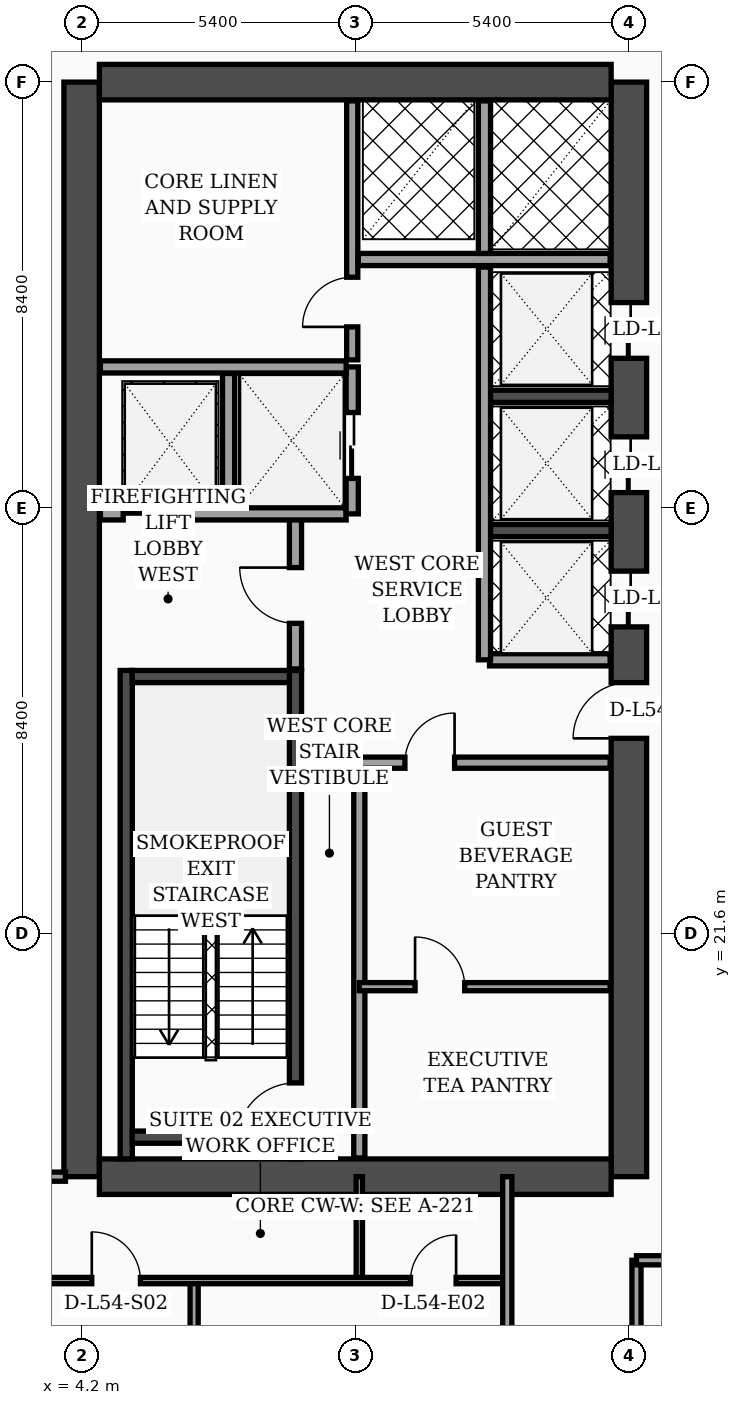
"""IFC4 building model, lengths in metres.
Left out: names, types, materials, properties, quantities, classifications, styles, units other than length and angle.
Written with IfcOpenShell. Run it as: python <this file> out.ifc"""

import sys

from ifc_helpers import new_model, si_unit, direction, frame, frame_2d, origin, place, context, subcontext, project, spatial, rectangle, extrude, element, fill, save


model = new_model("IFC4")
c1 = context("Model", 3, precision=1e-05, world=origin(), true_north=direction((0.0, 1.0)))
c2 = subcontext(c1, "Body", "Model", "MODEL_VIEW")
j1 = project(units=[si_unit("LENGTHUNIT", "METRE"), si_unit("PLANEANGLEUNIT", "RADIAN")], contexts=[c1])
p1 = place(None, origin())
s1 = spatial("IfcSite", under=j1, at=p1, CompositionType="ELEMENT")
p2 = place(p1, origin())
s2 = spatial("IfcBuilding", under=s1, at=p2, CompositionType="ELEMENT")
p3 = place(p2, frame((0.0, 0.0, 219.3)))
s3 = spatial("IfcBuildingStorey", under=s2, at=p3, CompositionType="ELEMENT", Elevation=219.3)
p4 = place(p3, frame((4.2, 16.8, 0.0), z_axis=(0.0, 0.0, 1.0), x_axis=(0.0, 1.0, 0.0)))
e1 = element("IfcWall", 1, at=p4, inside=s3, PredefinedType="SHEAR", context=c2, shape_type="SweptSolid", body=[
    extrude(rectangle(XDim=21.6, YDim=0.7, at=frame_2d((10.8, 0.0))), origin(), (0.0, 0.0, 1.0), 3.56),
])
p5 = place(p3, frame((15.0, 16.8, 0.0), z_axis=(0.0, 0.0, 1.0), x_axis=(0.0, 1.0, 0.0)))
e2 = element("IfcWall", 2, at=p5, inside=s3, PredefinedType="SHEAR", context=c2, shape_type="SweptSolid", body=[
    extrude(rectangle(XDim=21.6, YDim=0.7, at=frame_2d((10.8, 0.0))), origin(), (0.0, 0.0, 1.0), 3.56),
])
p6 = place(p5, frame((8.65, 0.0, 0.0)))
e3 = element("IfcOpeningElement", 3, at=p6, cuts=e2, PredefinedType="OPENING", context=c2, shape_type="SweptSolid", body=[
    extrude(rectangle(XDim=1.1, YDim=2.2, at=frame_2d((0.55, 1.1))), frame((0.0, 0.36, 0.0), z_axis=(0.0, -1.0, 0.0), x_axis=(1.0, 0.0, 0.0)), (0.0, 0.0, 1.0), 0.72),
])
p7 = place(p5, frame((10.85, 0.0, 0.0)))
e4 = element("IfcOpeningElement", 4, at=p7, cuts=e2, PredefinedType="OPENING", context=c2, shape_type="SweptSolid", body=[
    extrude(rectangle(XDim=1.1, YDim=2.2, at=frame_2d((0.55, 1.1))), frame((0.0, 0.36, 0.0), z_axis=(0.0, -1.0, 0.0), x_axis=(1.0, 0.0, 0.0)), (0.0, 0.0, 1.0), 0.72),
])
p8 = place(p5, frame((13.5, 0.0, 0.0)))
e5 = element("IfcOpeningElement", 5, at=p8, cuts=e2, PredefinedType="OPENING", context=c2, shape_type="SweptSolid", body=[
    extrude(rectangle(XDim=1.1, YDim=2.2, at=frame_2d((0.55, 1.1))), frame((0.0, 0.36, 0.0), z_axis=(0.0, -1.0, 0.0), x_axis=(1.0, 0.0, 0.0)), (0.0, 0.0, 1.0), 0.72),
])
p9 = place(p5, frame((16.15, 0.0, 0.0)))
e6 = element("IfcOpeningElement", 6, at=p9, cuts=e2, PredefinedType="OPENING", context=c2, shape_type="SweptSolid", body=[
    extrude(rectangle(XDim=1.1, YDim=2.2, at=frame_2d((0.55, 1.1))), frame((0.0, 0.36, 0.0), z_axis=(0.0, -1.0, 0.0), x_axis=(1.0, 0.0, 0.0)), (0.0, 0.0, 1.0), 0.72),
])
for number, where, z_axis, x_axis in (
    (7, (4.55, 38.4, 0.0), (0.0, 0.0, 1.0), (1.0, 0.0, 0.0)),
    (8, (4.55, 16.8, 0.0), (0.0, 0.0, 1.0), (1.0, 0.0, 0.0)),
):
    element("IfcWall", number, at=place(p3, frame(where, z_axis=z_axis, x_axis=x_axis)), inside=s3, PredefinedType="SHEAR", context=c2, shape_type="SweptSolid", body=[
        extrude(rectangle(XDim=10.1, YDim=0.7, at=frame_2d((5.05, 0.0))), origin(), (0.0, 0.0, 1.0), 3.56),
    ])
p10 = place(p3, frame((5.08, 17.15, 0.0), z_axis=(0.0, 0.0, 1.0), x_axis=(0.0, 1.0, 0.0)))
e9 = element("IfcWall", 9, at=p10, inside=s3, PredefinedType="SOLIDWALL", context=c2, shape_type="SweptSolid", body=[
    extrude(rectangle(XDim=9.64, YDim=0.24, at=frame_2d((4.82, 0.0))), origin(), (0.0, 0.0, 1.0), 3.56),
])
p11 = place(p3, frame((8.42, 17.15, 0.0), z_axis=(0.0, 0.0, 1.0), x_axis=(0.0, 1.0, 0.0)))
e10 = element("IfcWall", 10, at=p11, inside=s3, PredefinedType="SOLIDWALL", context=c2, shape_type="SweptSolid", body=[
    extrude(rectangle(XDim=9.64, YDim=0.24, at=frame_2d((4.82, 0.0))), origin(), (0.0, 0.0, 1.0), 3.56),
])
p12 = place(p11, frame((0.35, 0.0, 0.0)))
e11 = element("IfcOpeningElement", 11, at=p12, cuts=e10, PredefinedType="OPENING", context=c2, shape_type="SweptSolid", body=[
    extrude(rectangle(XDim=1.15, YDim=2.2, at=frame_2d((0.575, 1.1))), frame((0.0, 0.13, 0.0), z_axis=(0.0, -1.0, 0.0), x_axis=(1.0, 0.0, 0.0)), (0.0, 0.0, 1.0), 0.26),
])
for number, where, z_axis, x_axis in (
    (12, (5.2, 17.58, 0.0), (0.0, 0.0, 1.0), (1.0, 0.0, 0.0)),
    (13, (5.2, 26.67, 0.0), (0.0, 0.0, 1.0), (1.0, 0.0, 0.0)),
):
    element("IfcWall", number, at=place(p3, frame(where, z_axis=z_axis, x_axis=x_axis)), inside=s3, PredefinedType="SOLIDWALL", context=c2, shape_type="SweptSolid", body=[
        extrude(rectangle(XDim=3.1, YDim=0.24, at=frame_2d((1.55, 0.0))), origin(), (0.0, 0.0, 1.0), 3.56),
    ])
for number, where, z_axis, x_axis in (
    (14, (12.18, 29.55, 0.0), (0.0, 0.0, 1.0), (1.0, 0.0, 0.0)),
    (15, (12.18, 32.2, 0.0), (0.0, 0.0, 1.0), (1.0, 0.0, 0.0)),
):
    element("IfcWall", number, at=place(p3, frame(where, z_axis=z_axis, x_axis=x_axis)), inside=s3, PredefinedType="SOLIDWALL", context=c2, shape_type="SweptSolid", body=[
        extrude(rectangle(XDim=2.47, YDim=0.24, at=frame_2d((1.235, 0.0))), origin(), (0.0, 0.0, 1.0), 3.56),
    ])
p13 = place(p3, frame((8.42, 26.82, 0.0), z_axis=(0.0, 0.0, 1.0), x_axis=(0.0, 1.0, 0.0)))
e16 = element("IfcWall", 16, at=p13, inside=s3, PredefinedType="SOLIDWALL", context=c2, shape_type="SweptSolid", body=[
    extrude(rectangle(XDim=3.0, YDim=0.24, at=frame_2d((1.5, 0.0))), origin(), (0.0, 0.0, 1.0), 3.56),
])
p14 = place(p13, frame((0.9, 0.0, 0.0)))
e17 = element("IfcOpeningElement", 17, at=p14, cuts=e16, PredefinedType="OPENING", context=c2, shape_type="SweptSolid", body=[
    extrude(rectangle(XDim=1.1, YDim=2.2, at=frame_2d((0.55, 1.1))), frame((0.0, 0.13, 0.0), z_axis=(0.0, -1.0, 0.0), x_axis=(1.0, 0.0, 0.0)), (0.0, 0.0, 1.0), 0.26),
])
p15 = place(p3, frame((4.57, 29.88, 0.0), z_axis=(0.0, 0.0, 1.0), x_axis=(1.0, 0.0, 0.0)))
e18 = element("IfcWall", 18, at=p15, inside=s3, PredefinedType="SOLIDWALL", context=c2, shape_type="SweptSolid", body=[
    extrude(rectangle(XDim=4.85, YDim=0.24, at=frame_2d((2.425, 0.0))), origin(), (0.0, 0.0, 1.0), 3.56),
])
p16 = place(p15, frame((0.45, 0.0, 0.0)))
e19 = element("IfcOpeningElement", 19, at=p16, cuts=e18, PredefinedType="OPENING", context=c2, shape_type="SweptSolid", body=[
    extrude(rectangle(XDim=1.3, YDim=2.35, at=frame_2d((0.65, 1.175))), frame((0.0, 0.13, 0.0), z_axis=(0.0, -1.0, 0.0), x_axis=(1.0, 0.0, 0.0)), (0.0, 0.0, 1.0), 0.26),
])
p17 = place(p3, frame((7.1, 30.02, 0.0), z_axis=(0.0, 0.0, 1.0), x_axis=(0.0, 1.0, 0.0)))
e20 = element("IfcWall", 20, at=p17, inside=s3, PredefinedType="SOLIDWALL", context=c2, shape_type="SweptSolid", body=[
    extrude(rectangle(XDim=2.63, YDim=0.24, at=frame_2d((1.315, 0.0))), origin(), (0.0, 0.0, 1.0), 3.56),
])
p18 = place(p3, frame((9.54, 29.88, 0.0), z_axis=(0.0, 0.0, 1.0), x_axis=(0.0, 1.0, 0.0)))
e21 = element("IfcWall", 21, at=p18, inside=s3, PredefinedType="SOLIDWALL", context=c2, shape_type="SweptSolid", body=[
    extrude(rectangle(XDim=2.9, YDim=0.24, at=frame_2d((1.45, 0.0))), origin(), (0.0, 0.0, 1.0), 3.56),
])
p19 = place(p18, frame((0.7, 0.0, 0.0)))
e22 = element("IfcOpeningElement", 22, at=p19, cuts=e21, PredefinedType="OPENING", context=c2, shape_type="SweptSolid", body=[
    extrude(rectangle(XDim=1.3, YDim=2.35, at=frame_2d((0.65, 1.175))), frame((0.0, 0.13, 0.0), z_axis=(0.0, -1.0, 0.0), x_axis=(1.0, 0.0, 0.0)), (0.0, 0.0, 1.0), 0.26),
])
p20 = place(p3, frame((4.57, 32.78, 0.0), z_axis=(0.0, 0.0, 1.0), x_axis=(1.0, 0.0, 0.0)))
e23 = element("IfcWall", 23, at=p20, inside=s3, PredefinedType="SOLIDWALL", context=c2, shape_type="SweptSolid", body=[
    extrude(rectangle(XDim=4.85, YDim=0.24, at=frame_2d((2.425, 0.0))), origin(), (0.0, 0.0, 1.0), 3.19),
])
p21 = place(p3, frame((9.68, 17.17, 0.0), z_axis=(0.0, 0.0, 1.0), x_axis=(0.0, 1.0, 0.0)))
e24 = element("IfcWall", 24, at=p21, inside=s3, PredefinedType="SOLIDWALL", context=c2, shape_type="SweptSolid", body=[
    extrude(rectangle(XDim=7.83, YDim=0.22, at=frame_2d((3.915, 0.0))), origin(), (0.0, 0.0, 1.0), 3.56),
])
p22 = place(p3, frame((9.54, 32.92, 0.0), z_axis=(0.0, 0.0, 1.0), x_axis=(0.0, 1.0, 0.0)))
e25 = element("IfcWall", 25, at=p22, inside=s3, PredefinedType="SOLIDWALL", context=c2, shape_type="SweptSolid", body=[
    extrude(rectangle(XDim=5.11, YDim=0.22, at=frame_2d((2.555, 0.0))), origin(), (0.0, 0.0, 1.0), 3.56),
])
p23 = place(p22, frame((0.65, 0.0, 0.0)))
e26 = element("IfcOpeningElement", 26, at=p23, cuts=e25, PredefinedType="OPENING", context=c2, shape_type="SweptSolid", body=[
    extrude(rectangle(XDim=0.98, YDim=2.15, at=frame_2d((0.49, 1.075))), frame((0.0, 0.12, 0.0), z_axis=(0.0, -1.0, 0.0), x_axis=(1.0, 0.0, 0.0)), (0.0, 0.0, 1.0), 0.24),
])
p24 = place(p3, frame((9.68, 20.55, 0.0), z_axis=(0.0, 0.0, 1.0), x_axis=(1.0, 0.0, 0.0)))
e27 = element("IfcWall", 27, at=p24, inside=s3, PredefinedType="PARTITIONING", context=c2, shape_type="SweptSolid", body=[
    extrude(rectangle(XDim=4.95, YDim=0.16, at=frame_2d((2.475, 0.0))), origin(), (0.0, 0.0, 1.0), 3.56),
])
p25 = place(p24, frame((1.1, 0.0, 0.0)))
e28 = element("IfcOpeningElement", 28, at=p25, cuts=e27, PredefinedType="OPENING", context=c2, shape_type="SweptSolid", body=[
    extrude(rectangle(XDim=0.98, YDim=2.15, at=frame_2d((0.49, 1.075))), frame((0.0, 0.09, 0.0), z_axis=(0.0, -1.0, 0.0), x_axis=(1.0, 0.0, 0.0)), (0.0, 0.0, 1.0), 0.18),
])
p26 = place(p3, frame((9.68, 24.97, 0.0), z_axis=(0.0, 0.0, 1.0), x_axis=(1.0, 0.0, 0.0)))
e29 = element("IfcWall", 29, at=p26, inside=s3, PredefinedType="SOLIDWALL", context=c2, shape_type="SweptSolid", body=[
    extrude(rectangle(XDim=4.95, YDim=0.22, at=frame_2d((2.475, 0.0))), origin(), (0.0, 0.0, 1.0), 2.94),
])
p27 = place(p26, frame((0.9, 0.0, 0.0)))
e30 = element("IfcOpeningElement", 30, at=p27, cuts=e29, PredefinedType="OPENING", context=c2, shape_type="SweptSolid", body=[
    extrude(rectangle(XDim=0.98, YDim=2.15, at=frame_2d((0.49, 1.075))), frame((0.0, 0.12, 0.0), z_axis=(0.0, -1.0, 0.0), x_axis=(1.0, 0.0, 0.0)), (0.0, 0.0, 1.0), 0.24),
])
p28 = place(p3, frame((12.25, 27.0, 0.0), z_axis=(0.0, 0.0, 1.0), x_axis=(1.0, 0.0, 0.0)))
e31 = element("IfcWall", 31, at=p28, inside=s3, PredefinedType="SOLIDWALL", context=c2, shape_type="SweptSolid", body=[
    extrude(rectangle(XDim=2.38, YDim=0.24, at=frame_2d((1.19, 0.0))), origin(), (0.0, 0.0, 1.0), 3.56),
])
p29 = place(p3, frame((12.15, 27.0, 0.0), z_axis=(0.0, 0.0, 1.0), x_axis=(0.0, 1.0, 0.0)))
e32 = element("IfcWall", 32, at=p29, inside=s3, PredefinedType="SOLIDWALL", context=c2, shape_type="SweptSolid", body=[
    extrude(rectangle(XDim=7.75, YDim=0.24, at=frame_2d((3.875, 0.0))), origin(), (0.0, 0.0, 1.0), 3.56),
])
p30 = place(p3, frame((9.66, 34.9, 0.0), z_axis=(0.0, 0.0, 1.0), x_axis=(1.0, 0.0, 0.0)))
e33 = element("IfcWall", 33, at=p30, inside=s3, PredefinedType="SOLIDWALL", context=c2, shape_type="SweptSolid", body=[
    extrude(rectangle(XDim=4.97, YDim=0.24, at=frame_2d((2.485, 0.0))), origin(), (0.0, 0.0, 1.0), 3.56),
])
p31 = place(p3, frame((12.15, 35.02, 0.0), z_axis=(0.0, 0.0, 1.0), x_axis=(0.0, 1.0, 0.0)))
e34 = element("IfcWall", 34, at=p31, inside=s3, PredefinedType="SOLIDWALL", context=c2, shape_type="SweptSolid", body=[
    extrude(rectangle(XDim=3.01, YDim=0.24, at=frame_2d((1.505, 0.0))), origin(), (0.0, 0.0, 1.0), 3.56),
])
p32 = place(p3, frame((0.08, 16.8, 0.0), z_axis=(0.0, 0.0, 1.0), x_axis=(1.0, 0.0, 0.0)))
e35 = element("IfcWall", 35, at=p32, inside=s3, PredefinedType="PARTITIONING", context=c2, shape_type="SweptSolid", body=[
    extrude(rectangle(XDim=3.8, YDim=0.18, at=frame_2d((1.9, 0.0))), origin(), (0.0, 0.0, 1.0), 2.94),
])
p33 = place(p3, frame((9.68, 14.75, 0.0), z_axis=(0.0, 0.0, 1.0), x_axis=(0.0, 1.0, 0.0)))
e36 = element("IfcWall", 36, at=p33, inside=s3, PredefinedType="PARTITIONING", context=c2, shape_type="SweptSolid", body=[
    extrude(rectangle(XDim=2.05, YDim=0.125, at=frame_2d((1.025, 0.0))), origin(), (0.0, 0.0, 1.0), 3.56),
])
p34 = place(p3, frame((6.42, 9.5, 0.0), z_axis=(0.0, 0.0, 1.0), x_axis=(0.0, 1.0, 0.0)))
e37 = element("IfcWall", 37, at=p34, inside=s3, PredefinedType="PARTITIONING", context=c2, shape_type="SweptSolid", body=[
    extrude(rectangle(XDim=5.25, YDim=0.16, at=frame_2d((2.625, 0.0))), origin(), (0.0, 0.0, 1.0), 3.14),
])
p35 = place(p34, frame((2.15, 0.0, 0.0)))
e38 = element("IfcOpeningElement", 38, at=p35, cuts=e37, PredefinedType="OPENING", context=c2, shape_type="SweptSolid", body=[
    extrude(rectangle(XDim=0.96, YDim=2.2, at=frame_2d((0.48, 1.1))), frame((0.0, 0.09, 0.0), z_axis=(0.0, -1.0, 0.0), x_axis=(1.0, 0.0, 0.0)), (0.0, 0.0, 1.0), 0.18),
])
p36 = place(p3, frame((0.08, 14.75, 0.0), z_axis=(0.0, 0.0, 1.0), x_axis=(1.0, 0.0, 0.0)))
e39 = element("IfcWall", 39, at=p36, inside=s3, PredefinedType="PARTITIONING", context=c2, shape_type="SweptSolid", body=[
    extrude(rectangle(XDim=12.52, YDim=0.125, at=frame_2d((6.26, 0.0))), origin(), (0.0, 0.0, 1.0), 2.94),
])
p37 = place(p36, frame((4.32, 0.0, 0.0)))
e40 = element("IfcOpeningElement", 40, at=p37, cuts=e39, PredefinedType="OPENING", context=c2, shape_type="SweptSolid", body=[
    extrude(rectangle(XDim=0.96, YDim=2.2, at=frame_2d((0.48, 1.1))), frame((0.0, 0.073, 0.0), z_axis=(0.0, -1.0, 0.0), x_axis=(1.0, 0.0, 0.0)), (0.0, 0.0, 1.0), 0.145),
])
p38 = place(p36, frame((10.61, 0.0, 0.0)))
e41 = element("IfcOpeningElement", 41, at=p38, cuts=e39, PredefinedType="OPENING", context=c2, shape_type="SweptSolid", body=[
    extrude(rectangle(XDim=0.9, YDim=2.15, at=frame_2d((0.45, 1.075))), frame((0.0, 0.073, 0.0), z_axis=(0.0, -1.0, 0.0), x_axis=(1.0, 0.0, 0.0)), (0.0, 0.0, 1.0), 0.145),
])
p39 = place(p3, frame((12.6, 2.44, 0.0), z_axis=(0.0, 0.0, 1.0), x_axis=(0.0, 1.0, 0.0)))
e42 = element("IfcWall", 42, at=p39, inside=s3, PredefinedType="PARTITIONING", context=c2, shape_type="SweptSolid", body=[
    extrude(rectangle(XDim=14.36, YDim=0.18, at=frame_2d((7.18, 0.0))), origin(), (0.0, 0.0, 1.0), 2.94),
])
p40 = place(p39, frame((3.01, 0.0, 0.0)))
e43 = element("IfcOpeningElement", 43, at=p40, cuts=e42, PredefinedType="OPENING", context=c2, shape_type="SweptSolid", body=[
    extrude(rectangle(XDim=1.02, YDim=2.2, at=frame_2d((0.51, 1.1))), frame((0.0, 0.1, 0.0), z_axis=(0.0, -1.0, 0.0), x_axis=(1.0, 0.0, 0.0)), (0.0, 0.0, 1.0), 0.2),
])
p41 = place(p39, frame((9.18, 0.0, 0.0)))
e44 = element("IfcOpeningElement", 44, at=p41, cuts=e42, PredefinedType="OPENING", context=c2, shape_type="SweptSolid", body=[
    extrude(rectangle(XDim=1.02, YDim=2.2, at=frame_2d((0.51, 1.1))), frame((0.0, 0.1, 0.0), z_axis=(0.0, -1.0, 0.0), x_axis=(1.0, 0.0, 0.0)), (0.0, 0.0, 1.0), 0.2),
])
p42 = place(p3, frame((15.15, 2.44, 0.0), z_axis=(0.0, 0.0, 1.0), x_axis=(0.0, 1.0, 0.0)))
e45 = element("IfcWall", 45, at=p42, inside=s3, PredefinedType="PARTITIONING", context=c2, shape_type="SweptSolid", body=[
    extrude(rectangle(XDim=12.71, YDim=0.18, at=frame_2d((6.355, 0.0))), origin(), (0.0, 0.0, 1.0), 3.09),
])
p43 = place(p3, frame((15.15, 15.15, 0.0), z_axis=(0.0, 0.0, 1.0), x_axis=(1.0, 0.0, 0.0)))
e46 = element("IfcWall", 46, at=p43, inside=s3, PredefinedType="PARTITIONING", context=c2, shape_type="SweptSolid", body=[
    extrude(rectangle(XDim=6.45, YDim=0.18, at=frame_2d((3.225, 0.0))), origin(), (0.0, 0.0, 1.0), 2.59),
])
p44 = place(p43, frame((1.74, 0.0, 0.0)))
e47 = element("IfcOpeningElement", 47, at=p44, cuts=e46, PredefinedType="OPENING", context=c2, shape_type="SweptSolid", body=[
    extrude(rectangle(XDim=1.02, YDim=2.2, at=frame_2d((0.51, 1.1))), frame((0.0, 0.1, 0.0), z_axis=(0.0, -1.0, 0.0), x_axis=(1.0, 0.0, 0.0)), (0.0, 0.0, 1.0), 0.2),
])
p45 = place(p14, origin())
e48 = element("IfcDoor", 48, at=p45, inside=s3, OperationType="SINGLE_SWING_RIGHT", PredefinedType="DOOR", context=c2, shape_type="SweptSolid", body=[
    extrude(rectangle(XDim=1.1, YDim=2.2, at=frame_2d((0.55, 1.1))), frame((0.0, 0.025, 0.0), z_axis=(0.0, -1.0, 0.0), x_axis=(1.0, 0.0, 0.0)), (0.0, 0.0, 1.0), 0.05),
])
fill(e17, e48)
p46 = place(p16, origin())
e49 = element("IfcDoor", 49, at=p46, inside=s3, OperationType="DOUBLE_DOOR_SLIDING", PredefinedType="DOOR", context=c2, shape_type="SweptSolid", body=[
    extrude(rectangle(XDim=1.3, YDim=2.35, at=frame_2d((0.65, 1.175))), frame((0.0, 0.025, 0.0), z_axis=(0.0, -1.0, 0.0), x_axis=(1.0, 0.0, 0.0)), (0.0, 0.0, 1.0), 0.05),
])
fill(e19, e49)
p47 = place(p19, origin())
e50 = element("IfcDoor", 50, at=p47, inside=s3, OperationType="DOUBLE_DOOR_SLIDING", PredefinedType="DOOR", context=c2, shape_type="SweptSolid", body=[
    extrude(rectangle(XDim=1.3, YDim=2.35, at=frame_2d((0.65, 1.175))), frame((0.0, 0.025, 0.0), z_axis=(0.0, -1.0, 0.0), x_axis=(1.0, 0.0, 0.0)), (0.0, 0.0, 1.0), 0.05),
])
fill(e22, e50)
p48 = place(p23, origin())
e51 = element("IfcDoor", 51, at=p48, inside=s3, OperationType="SINGLE_SWING_LEFT", PredefinedType="DOOR", context=c2, shape_type="SweptSolid", body=[
    extrude(rectangle(XDim=0.98, YDim=2.15, at=frame_2d((0.49, 1.075))), frame((0.0, 0.025, 0.0), z_axis=(0.0, -1.0, 0.0), x_axis=(1.0, 0.0, 0.0)), (0.0, 0.0, 1.0), 0.05),
])
fill(e26, e51)
p49 = place(p25, origin())
e52 = element("IfcDoor", 52, at=p49, inside=s3, OperationType="SINGLE_SWING_LEFT", PredefinedType="DOOR", context=c2, shape_type="SweptSolid", body=[
    extrude(rectangle(XDim=0.98, YDim=2.15, at=frame_2d((0.49, 1.075))), frame((0.0, 0.025, 0.0), z_axis=(0.0, -1.0, 0.0), x_axis=(1.0, 0.0, 0.0)), (0.0, 0.0, 1.0), 0.05),
])
fill(e28, e52)
p50 = place(p27, origin())
e53 = element("IfcDoor", 53, at=p50, inside=s3, OperationType="SINGLE_SWING_RIGHT", PredefinedType="DOOR", context=c2, shape_type="SweptSolid", body=[
    extrude(rectangle(XDim=0.98, YDim=2.15, at=frame_2d((0.49, 1.075))), frame((0.0, 0.025, 0.0), z_axis=(0.0, -1.0, 0.0), x_axis=(1.0, 0.0, 0.0)), (0.0, 0.0, 1.0), 0.05),
])
fill(e30, e53)
p51 = place(p37, origin())
e54 = element("IfcDoor", 54, at=p51, inside=s3, OperationType="SINGLE_SWING_LEFT", PredefinedType="DOOR", context=c2, shape_type="SweptSolid", body=[
    extrude(rectangle(XDim=0.96, YDim=2.2, at=frame_2d((0.48, 1.1))), frame((0.0, 0.025, 0.0), z_axis=(0.0, -1.0, 0.0), x_axis=(1.0, 0.0, 0.0)), (0.0, 0.0, 1.0), 0.05),
])
fill(e40, e54)
p52 = place(p38, origin())
e55 = element("IfcDoor", 55, at=p52, inside=s3, OperationType="SINGLE_SWING_RIGHT", PredefinedType="DOOR", context=c2, shape_type="SweptSolid", body=[
    extrude(rectangle(XDim=0.9, YDim=2.15, at=frame_2d((0.45, 1.075))), frame((0.0, 0.025, 0.0), z_axis=(0.0, -1.0, 0.0), x_axis=(1.0, 0.0, 0.0)), (0.0, 0.0, 1.0), 0.05),
])
fill(e41, e55)
p53 = place(p12, origin())
e56 = element("IfcDoor", 56, at=p53, inside=s3, OperationType="SINGLE_SWING_LEFT", PredefinedType="DOOR", context=c2, shape_type="SweptSolid", body=[
    extrude(rectangle(XDim=1.15, YDim=2.2, at=frame_2d((0.575, 1.1))), frame((0.0, 0.025, 0.0), z_axis=(0.0, -1.0, 0.0), x_axis=(1.0, 0.0, 0.0)), (0.0, 0.0, 1.0), 0.05),
])
fill(e11, e56)
p54 = place(p6, origin())
e57 = element("IfcDoor", 57, at=p54, inside=s3, OperationType="SINGLE_SWING_LEFT", PredefinedType="DOOR", context=c2, shape_type="SweptSolid", body=[
    extrude(rectangle(XDim=1.1, YDim=2.2, at=frame_2d((0.55, 1.1))), frame((0.0, 0.025, 0.0), z_axis=(0.0, -1.0, 0.0), x_axis=(1.0, 0.0, 0.0)), (0.0, 0.0, 1.0), 0.05),
])
fill(e3, e57)
p55 = place(p7, origin())
e58 = element("IfcDoor", 58, at=p55, inside=s3, OperationType="DOUBLE_DOOR_SLIDING", PredefinedType="DOOR", context=c2, shape_type="SweptSolid", body=[
    extrude(rectangle(XDim=1.1, YDim=2.2, at=frame_2d((0.55, 1.1))), frame((0.0, 0.025, 0.0), z_axis=(0.0, -1.0, 0.0), x_axis=(1.0, 0.0, 0.0)), (0.0, 0.0, 1.0), 0.05),
])
fill(e4, e58)
p56 = place(p8, origin())
e59 = element("IfcDoor", 59, at=p56, inside=s3, OperationType="DOUBLE_DOOR_SLIDING", PredefinedType="DOOR", context=c2, shape_type="SweptSolid", body=[
    extrude(rectangle(XDim=1.1, YDim=2.2, at=frame_2d((0.55, 1.1))), frame((0.0, 0.025, 0.0), z_axis=(0.0, -1.0, 0.0), x_axis=(1.0, 0.0, 0.0)), (0.0, 0.0, 1.0), 0.05),
])
fill(e5, e59)
p57 = place(p9, origin())
e60 = element("IfcDoor", 60, at=p57, inside=s3, OperationType="DOUBLE_DOOR_SLIDING", PredefinedType="DOOR", context=c2, shape_type="SweptSolid", body=[
    extrude(rectangle(XDim=1.1, YDim=2.2, at=frame_2d((0.55, 1.1))), frame((0.0, 0.025, 0.0), z_axis=(0.0, -1.0, 0.0), x_axis=(1.0, 0.0, 0.0)), (0.0, 0.0, 1.0), 0.05),
])
fill(e6, e60)
save(model, sys.argv[1])
